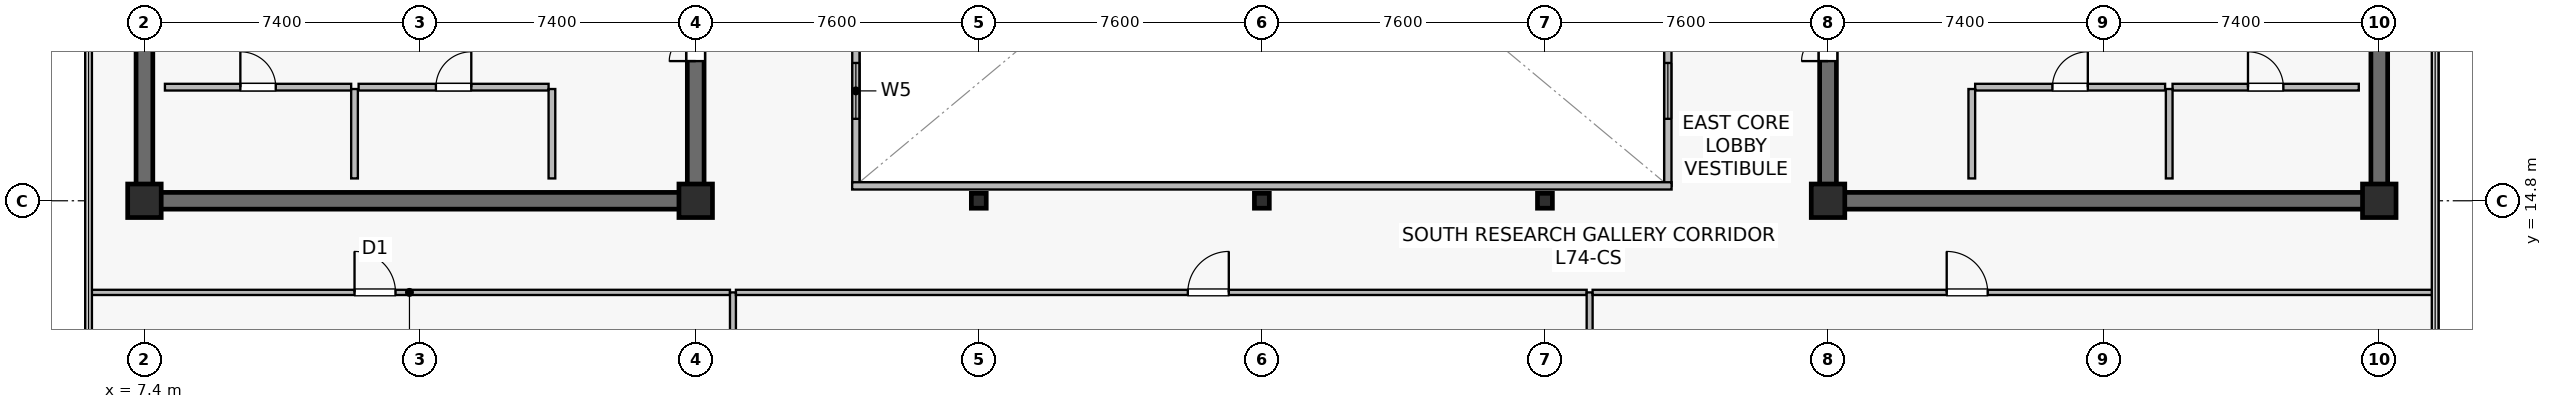
"""IFC4 building model, lengths in metres.
Left out: names, types, materials, properties, quantities, classifications, styles, units other than length and angle.
Written with IfcOpenShell. Run it as: python <this file> out.ifc"""

import sys

from ifc_helpers import new_model, si_unit, direction, frame, frame_2d, origin, origin_2d, place, context, subcontext, project, spatial, rectangle, i_section, extrude, source, transform, mapped, element, fill, save


model = new_model("IFC4")
c1 = context("Model", 3, precision=1e-05, world=origin(), true_north=direction((0.0, 1.0)))
c2 = subcontext(c1, "Body", "Model", "MODEL_VIEW")
j1 = project(units=[si_unit("LENGTHUNIT", "METRE"), si_unit("PLANEANGLEUNIT", "RADIAN")], contexts=[c1])
p1 = place(None, origin())
s1 = spatial("IfcSite", under=j1, at=p1, CompositionType="ELEMENT")
p2 = place(p1, origin())
s2 = spatial("IfcBuilding", under=s1, at=p2, CompositionType="ELEMENT")
p3 = place(p2, frame((0.0, 0.0, 310.2)))
s3 = spatial("IfcBuildingStorey", under=s2, at=p3, CompositionType="ELEMENT", Elevation=310.2)
p4 = place(p3, frame((7.175, 14.8, 0.0), z_axis=(0.0, 0.0, 1.0), x_axis=(1.0, 0.0, 0.0)))
e1 = element("IfcWall", 1, at=p4, inside=s3, PredefinedType="SHEAR", context=c2, shape_type="SweptSolid", body=[
    extrude(rectangle(XDim=15.25, YDim=0.45, at=frame_2d((7.625, 0.0))), origin(), (0.0, 0.0, 1.0), 3.9),
])
p5 = place(p3, frame((7.4, 15.025, 0.0), z_axis=(0.0, 0.0, 1.0), x_axis=(0.0, 1.0, 0.0)))
e2 = element("IfcWall", 2, at=p5, inside=s3, PredefinedType="SHEAR", context=c2, shape_type="SweptSolid", body=[
    extrude(rectangle(XDim=18.55, YDim=0.45, at=frame_2d((9.275, 0.0))), origin(), (0.0, 0.0, 1.0), 3.9),
])
p6 = place(p3, frame((22.2, 15.025, 0.0), z_axis=(0.0, 0.0, 1.0), x_axis=(0.0, 1.0, 0.0)))
e3 = element("IfcWall", 3, at=p6, inside=s3, PredefinedType="SHEAR", context=c2, shape_type="SweptSolid", body=[
    extrude(rectangle(XDim=18.55, YDim=0.45, at=frame_2d((9.275, 0.0))), origin(), (0.0, 0.0, 1.0), 3.9),
])
p7 = place(p6, frame((3.525, 0.0, 0.0)))
e4 = element("IfcOpeningElement", 4, at=p7, cuts=e3, PredefinedType="OPENING", context=c2, shape_type="SweptSolid", body=[
    extrude(rectangle(XDim=1.42, YDim=2.2, at=frame_2d((0.71, 1.1))), frame((0.0, 0.235, 0.0), z_axis=(0.0, -1.0, 0.0), x_axis=(1.0, 0.0, 0.0)), (0.0, 0.0, 1.0), 0.47),
])
p8 = place(p3, frame((52.375, 14.8, 0.0), z_axis=(0.0, 0.0, 1.0), x_axis=(1.0, 0.0, 0.0)))
e5 = element("IfcWall", 5, at=p8, inside=s3, PredefinedType="SHEAR", context=c2, shape_type="SweptSolid", body=[
    extrude(rectangle(XDim=15.25, YDim=0.45, at=frame_2d((7.625, 0.0))), origin(), (0.0, 0.0, 1.0), 3.9),
])
p9 = place(p3, frame((52.6, 15.025, 0.0), z_axis=(0.0, 0.0, 1.0), x_axis=(0.0, 1.0, 0.0)))
e6 = element("IfcWall", 6, at=p9, inside=s3, PredefinedType="SHEAR", context=c2, shape_type="SweptSolid", body=[
    extrude(rectangle(XDim=18.55, YDim=0.45, at=frame_2d((9.275, 0.0))), origin(), (0.0, 0.0, 1.0), 3.9),
])
p10 = place(p9, frame((3.525, 0.0, 0.0)))
e7 = element("IfcOpeningElement", 7, at=p10, cuts=e6, PredefinedType="OPENING", context=c2, shape_type="SweptSolid", body=[
    extrude(rectangle(XDim=1.42, YDim=2.2, at=frame_2d((0.71, 1.1))), frame((0.0, 0.235, 0.0), z_axis=(0.0, -1.0, 0.0), x_axis=(1.0, 0.0, 0.0)), (0.0, 0.0, 1.0), 0.47),
])
p11 = place(p3, frame((67.4, 15.025, 0.0), z_axis=(0.0, 0.0, 1.0), x_axis=(0.0, 1.0, 0.0)))
e8 = element("IfcWall", 8, at=p11, inside=s3, PredefinedType="SHEAR", context=c2, shape_type="SweptSolid", body=[
    extrude(rectangle(XDim=18.55, YDim=0.45, at=frame_2d((9.275, 0.0))), origin(), (0.0, 0.0, 1.0), 3.9),
])
m1 = source(origin(), c2, "Body", "SweptSolid", [
    extrude(rectangle(XDim=0.9, YDim=0.9, at=origin_2d()), origin(), (0.0, 0.0, 1.0), 4.2),
])
for number, where, z_axis, x_axis in (
    (9, (7.4, 14.8, 0.0), (0.0, 0.0, 1.0), (1.0, 0.0, 0.0)),
    (10, (22.2, 14.8, 0.0), (0.0, 0.0, 1.0), (1.0, 0.0, 0.0)),
    (11, (52.6, 14.8, 0.0), (0.0, 0.0, 1.0), (1.0, 0.0, 0.0)),
    (12, (67.4, 14.8, 0.0), (0.0, 0.0, 1.0), (1.0, 0.0, 0.0)),
):
    element("IfcColumn", number, at=place(p3, frame(where, z_axis=z_axis, x_axis=x_axis)), inside=s3, PredefinedType="COLUMN", context=c2, shape_type="MappedRepresentation", body=[
        mapped(m1, transform((0.0, 0.0, 0.0), scale=1.0)),
    ])
m2 = source(origin(), c2, "Body", "SweptSolid", [
    extrude(i_section(OverallWidth=0.4, OverallDepth=0.4, WebThickness=0.021, FlangeThickness=0.021, at=origin_2d()), origin(), (0.0, 0.0, 1.0), 4.2),
])
for number, where, z_axis, x_axis in (
    (13, (29.8, 14.8, 0.0), (0.0, 0.0, 1.0), (1.0, 0.0, 0.0)),
    (14, (37.4, 14.8, 0.0), (0.0, 0.0, 1.0), (1.0, 0.0, 0.0)),
    (15, (45.0, 14.8, 0.0), (0.0, 0.0, 1.0), (1.0, 0.0, 0.0)),
):
    element("IfcColumn", number, at=place(p3, frame(where, z_axis=z_axis, x_axis=x_axis)), inside=s3, PredefinedType="COLUMN", context=c2, shape_type="MappedRepresentation", body=[
        mapped(m2, transform((0.0, 0.0, 0.0), scale=1.0)),
    ])
p12 = place(p3, frame((7.95, 17.85, 0.0), z_axis=(0.0, 0.0, 1.0), x_axis=(1.0, 0.0, 0.0)))
e16 = element("IfcWall", 16, at=p12, inside=s3, PredefinedType="SOLIDWALL", context=c2, shape_type="SweptSolid", body=[
    extrude(rectangle(XDim=5.0, YDim=0.18, at=frame_2d((2.5, 0.0))), origin(), (0.0, 0.0, 1.0), 3.9),
])
p13 = place(p12, frame((2.025, 0.0, 0.0)))
e17 = element("IfcOpeningElement", 17, at=p13, cuts=e16, PredefinedType="OPENING", context=c2, shape_type="SweptSolid", body=[
    extrude(rectangle(XDim=0.95, YDim=2.15, at=frame_2d((0.475, 1.075))), frame((0.0, 0.1, 0.0), z_axis=(0.0, -1.0, 0.0), x_axis=(1.0, 0.0, 0.0)), (0.0, 0.0, 1.0), 0.2),
])
p14 = place(p3, frame((13.04, 15.4, 0.0), z_axis=(0.0, 0.0, 1.0), x_axis=(0.0, 1.0, 0.0)))
e18 = element("IfcWall", 18, at=p14, inside=s3, PredefinedType="SOLIDWALL", context=c2, shape_type="SweptSolid", body=[
    extrude(rectangle(XDim=2.4, YDim=0.18, at=frame_2d((1.2, 0.0))), origin(), (0.0, 0.0, 1.0), 3.9),
])
p15 = place(p3, frame((13.15, 17.85, 0.0), z_axis=(0.0, 0.0, 1.0), x_axis=(1.0, 0.0, 0.0)))
e19 = element("IfcWall", 19, at=p15, inside=s3, PredefinedType="SOLIDWALL", context=c2, shape_type="SweptSolid", body=[
    extrude(rectangle(XDim=5.1, YDim=0.18, at=frame_2d((2.55, 0.0))), origin(), (0.0, 0.0, 1.0), 3.297),
])
p16 = place(p15, frame((2.075, 0.0, 0.0)))
e20 = element("IfcOpeningElement", 20, at=p16, cuts=e19, PredefinedType="OPENING", context=c2, shape_type="SweptSolid", body=[
    extrude(rectangle(XDim=0.95, YDim=2.15, at=frame_2d((0.475, 1.075))), frame((0.0, 0.1, 0.0), z_axis=(0.0, -1.0, 0.0), x_axis=(1.0, 0.0, 0.0)), (0.0, 0.0, 1.0), 0.2),
])
p17 = place(p3, frame((18.34, 15.4, 0.0), z_axis=(0.0, 0.0, 1.0), x_axis=(0.0, 1.0, 0.0)))
e21 = element("IfcWall", 21, at=p17, inside=s3, PredefinedType="SOLIDWALL", context=c2, shape_type="SweptSolid", body=[
    extrude(rectangle(XDim=2.4, YDim=0.18, at=frame_2d((1.2, 0.0))), origin(), (0.0, 0.0, 1.0), 3.9),
])
p18 = place(p3, frame((61.85, 17.85, 0.0), z_axis=(0.0, 0.0, 1.0), x_axis=(1.0, 0.0, 0.0)))
e22 = element("IfcWall", 22, at=p18, inside=s3, PredefinedType="SOLIDWALL", context=c2, shape_type="SweptSolid", body=[
    extrude(rectangle(XDim=5.0, YDim=0.18, at=frame_2d((2.5, 0.0))), origin(), (0.0, 0.0, 1.0), 3.9),
])
p19 = place(p18, frame((2.025, 0.0, 0.0)))
e23 = element("IfcOpeningElement", 23, at=p19, cuts=e22, PredefinedType="OPENING", context=c2, shape_type="SweptSolid", body=[
    extrude(rectangle(XDim=0.95, YDim=2.15, at=frame_2d((0.475, 1.075))), frame((0.0, 0.1, 0.0), z_axis=(0.0, -1.0, 0.0), x_axis=(1.0, 0.0, 0.0)), (0.0, 0.0, 1.0), 0.2),
])
p20 = place(p3, frame((61.76, 15.4, 0.0), z_axis=(0.0, 0.0, 1.0), x_axis=(0.0, 1.0, 0.0)))
e24 = element("IfcWall", 24, at=p20, inside=s3, PredefinedType="SOLIDWALL", context=c2, shape_type="SweptSolid", body=[
    extrude(rectangle(XDim=2.4, YDim=0.18, at=frame_2d((1.2, 0.0))), origin(), (0.0, 0.0, 1.0), 3.9),
])
p21 = place(p3, frame((56.55, 17.85, 0.0), z_axis=(0.0, 0.0, 1.0), x_axis=(1.0, 0.0, 0.0)))
e25 = element("IfcWall", 25, at=p21, inside=s3, PredefinedType="SOLIDWALL", context=c2, shape_type="SweptSolid", body=[
    extrude(rectangle(XDim=5.1, YDim=0.18, at=frame_2d((2.55, 0.0))), origin(), (0.0, 0.0, 1.0), 3.297),
])
p22 = place(p21, frame((2.075, 0.0, 0.0)))
e26 = element("IfcOpeningElement", 26, at=p22, cuts=e25, PredefinedType="OPENING", context=c2, shape_type="SweptSolid", body=[
    extrude(rectangle(XDim=0.95, YDim=2.15, at=frame_2d((0.475, 1.075))), frame((0.0, 0.1, 0.0), z_axis=(0.0, -1.0, 0.0), x_axis=(1.0, 0.0, 0.0)), (0.0, 0.0, 1.0), 0.2),
])
p23 = place(p3, frame((56.46, 15.4, 0.0), z_axis=(0.0, 0.0, 1.0), x_axis=(0.0, 1.0, 0.0)))
e27 = element("IfcWall", 27, at=p23, inside=s3, PredefinedType="SOLIDWALL", context=c2, shape_type="SweptSolid", body=[
    extrude(rectangle(XDim=2.4, YDim=0.18, at=frame_2d((1.2, 0.0))), origin(), (0.0, 0.0, 1.0), 3.9),
])
p24 = place(p3, frame((26.5, 15.2, 0.0), z_axis=(0.0, 0.0, 1.0), x_axis=(0.0, 1.0, 0.0)))
e28 = element("IfcWall", 28, at=p24, inside=s3, PredefinedType="SOLIDWALL", context=c2, shape_type="SweptSolid", body=[
    extrude(rectangle(XDim=18.2, YDim=0.195, at=frame_2d((9.1, 0.0))), origin(), (0.0, 0.0, 1.0), 3.9),
])
p25 = place(p24, frame((1.8, 0.0, 0.9)))
e29 = element("IfcOpeningElement", 29, at=p25, cuts=e28, PredefinedType="OPENING", context=c2, shape_type="SweptSolid", body=[
    extrude(rectangle(XDim=1.5, YDim=1.4, at=frame_2d((0.75, 0.7))), frame((0.0, 0.107, 0.0), z_axis=(0.0, -1.0, 0.0), x_axis=(1.0, 0.0, 0.0)), (0.0, 0.0, 1.0), 0.215),
])
p26 = place(p24, frame((13.2, 0.0, 0.9)))
e30 = element("IfcOpeningElement", 30, at=p26, cuts=e28, PredefinedType="OPENING", context=c2, shape_type="SweptSolid", body=[
    extrude(rectangle(XDim=1.5, YDim=1.4, at=frame_2d((0.75, 0.7))), frame((0.0, 0.107, 0.0), z_axis=(0.0, -1.0, 0.0), x_axis=(1.0, 0.0, 0.0)), (0.0, 0.0, 1.0), 0.215),
])
p27 = place(p3, frame((48.3, 15.2, 0.0), z_axis=(0.0, 0.0, 1.0), x_axis=(0.0, 1.0, 0.0)))
e31 = element("IfcWall", 31, at=p27, inside=s3, PredefinedType="SOLIDWALL", context=c2, shape_type="SweptSolid", body=[
    extrude(rectangle(XDim=18.2, YDim=0.195, at=frame_2d((9.1, 0.0))), origin(), (0.0, 0.0, 1.0), 3.9),
])
p28 = place(p27, frame((1.8, 0.0, 0.9)))
e32 = element("IfcOpeningElement", 32, at=p28, cuts=e31, PredefinedType="OPENING", context=c2, shape_type="SweptSolid", body=[
    extrude(rectangle(XDim=1.5, YDim=1.4, at=frame_2d((0.75, 0.7))), frame((0.0, 0.107, 0.0), z_axis=(0.0, -1.0, 0.0), x_axis=(1.0, 0.0, 0.0)), (0.0, 0.0, 1.0), 0.215),
])
p29 = place(p27, frame((13.2, 0.0, 0.9)))
e33 = element("IfcOpeningElement", 33, at=p29, cuts=e31, PredefinedType="OPENING", context=c2, shape_type="SweptSolid", body=[
    extrude(rectangle(XDim=1.5, YDim=1.4, at=frame_2d((0.75, 0.7))), frame((0.0, 0.107, 0.0), z_axis=(0.0, -1.0, 0.0), x_axis=(1.0, 0.0, 0.0)), (0.0, 0.0, 1.0), 0.215),
])
p30 = place(p3, frame((26.4, 15.2, 0.0), z_axis=(0.0, 0.0, 1.0), x_axis=(1.0, 0.0, 0.0)))
e34 = element("IfcWall", 34, at=p30, inside=s3, PredefinedType="SOLIDWALL", context=c2, shape_type="SweptSolid", body=[
    extrude(rectangle(XDim=22.0, YDim=0.195, at=frame_2d((11.0, 0.0))), origin(), (0.0, 0.0, 1.0), 3.9),
])
p31 = place(p3, frame((5.91, 12.34, 0.0), z_axis=(0.0, 0.0, 1.0), x_axis=(1.0, 0.0, 0.0)))
e35 = element("IfcWall", 35, at=p31, inside=s3, PredefinedType="PARTITIONING", context=c2, shape_type="SweptSolid", body=[
    extrude(rectangle(XDim=17.21, YDim=0.14, at=frame_2d((8.605, 0.0))), origin(), (0.0, 0.0, 1.0), 3.297),
])
p32 = place(p31, frame((7.13, 0.0, 0.0)))
e36 = element("IfcOpeningElement", 36, at=p32, cuts=e35, PredefinedType="OPENING", context=c2, shape_type="SweptSolid", body=[
    extrude(rectangle(XDim=1.1, YDim=2.18, at=frame_2d((0.55, 1.09))), frame((0.0, 0.08, 0.0), z_axis=(0.0, -1.0, 0.0), x_axis=(1.0, 0.0, 0.0)), (0.0, 0.0, 1.0), 0.16),
])
p33 = place(p3, frame((23.2, 3.81, 0.0), z_axis=(0.0, 0.0, 1.0), x_axis=(0.0, 1.0, 0.0)))
e37 = element("IfcWall", 37, at=p33, inside=s3, PredefinedType="PARTITIONING", context=c2, shape_type="SweptSolid", body=[
    extrude(rectangle(XDim=8.53, YDim=0.16, at=frame_2d((4.265, 0.0))), origin(), (0.0, 0.0, 1.0), 2.985),
])
p34 = place(p3, frame((23.28, 12.34, 0.0), z_axis=(0.0, 0.0, 1.0), x_axis=(1.0, 0.0, 0.0)))
e38 = element("IfcWall", 38, at=p34, inside=s3, PredefinedType="PARTITIONING", context=c2, shape_type="SweptSolid", body=[
    extrude(rectangle(XDim=22.84, YDim=0.14, at=frame_2d((11.42, 0.0))), origin(), (0.0, 0.0, 1.0), 3.297),
])
p35 = place(p34, frame((12.132, 0.0, 0.0)))
e39 = element("IfcOpeningElement", 39, at=p35, cuts=e38, PredefinedType="OPENING", context=c2, shape_type="SweptSolid", body=[
    extrude(rectangle(XDim=1.1, YDim=2.18, at=frame_2d((0.55, 1.09))), frame((0.0, 0.08, 0.0), z_axis=(0.0, -1.0, 0.0), x_axis=(1.0, 0.0, 0.0)), (0.0, 0.0, 1.0), 0.16),
])
p36 = place(p3, frame((46.2, 4.81, 0.0), z_axis=(0.0, 0.0, 1.0), x_axis=(0.0, 1.0, 0.0)))
e40 = element("IfcWall", 40, at=p36, inside=s3, PredefinedType="PARTITIONING", context=c2, shape_type="SweptSolid", body=[
    extrude(rectangle(XDim=7.53, YDim=0.16, at=frame_2d((3.765, 0.0))), origin(), (0.0, 0.0, 1.0), 2.985),
])
p37 = place(p3, frame((46.28, 12.34, 0.0), z_axis=(0.0, 0.0, 1.0), x_axis=(1.0, 0.0, 0.0)))
e41 = element("IfcWall", 41, at=p37, inside=s3, PredefinedType="PARTITIONING", context=c2, shape_type="SweptSolid", body=[
    extrude(rectangle(XDim=22.61, YDim=0.14, at=frame_2d((11.305, 0.0))), origin(), (0.0, 0.0, 1.0), 3.297),
])
p38 = place(p37, frame((9.506, 0.0, 0.0)))
e42 = element("IfcOpeningElement", 42, at=p38, cuts=e41, PredefinedType="OPENING", context=c2, shape_type="SweptSolid", body=[
    extrude(rectangle(XDim=1.1, YDim=2.18, at=frame_2d((0.55, 1.09))), frame((0.0, 0.08, 0.0), z_axis=(0.0, -1.0, 0.0), x_axis=(1.0, 0.0, 0.0)), (0.0, 0.0, 1.0), 0.16),
])
m3 = source(origin(), c2, "Body", "SweptSolid", [
    extrude(rectangle(XDim=1.5, YDim=1.4, at=frame_2d((0.75, 0.7))), frame((0.0, 0.03, 0.0), z_axis=(0.0, -1.0, 0.0), x_axis=(1.0, 0.0, 0.0)), (0.0, 0.0, 1.0), 0.06),
])
p39 = place(p25, origin())
e43 = element("IfcWindow", 43, at=p39, inside=s3, PartitioningType="SINGLE_PANEL", PredefinedType="WINDOW", context=c2, shape_type="MappedRepresentation", body=[
    mapped(m3, transform((0.0, 0.0, 0.0), scale=1.0)),
])
fill(e29, e43)
p40 = place(p28, origin())
e44 = element("IfcWindow", 44, at=p40, inside=s3, PartitioningType="SINGLE_PANEL", PredefinedType="WINDOW", context=c2, shape_type="MappedRepresentation", body=[
    mapped(m3, transform((0.0, 0.0, 0.0), scale=1.0)),
])
fill(e32, e44)
m4 = source(origin(), c2, "Body", "SweptSolid", [
    extrude(rectangle(XDim=0.95, YDim=2.15, at=frame_2d((0.475, 1.075))), frame((0.0, 0.025, 0.0), z_axis=(0.0, -1.0, 0.0), x_axis=(1.0, 0.0, 0.0)), (0.0, 0.0, 1.0), 0.05),
])
p41 = place(p13, origin())
e45 = element("IfcDoor", 45, at=p41, inside=s3, OperationType="SINGLE_SWING_LEFT", PredefinedType="DOOR", context=c2, shape_type="MappedRepresentation", body=[
    mapped(m4, transform((0.0, 0.0, 0.0), scale=1.0)),
])
fill(e17, e45)
p42 = place(p16, origin())
e46 = element("IfcDoor", 46, at=p42, inside=s3, OperationType="SINGLE_SWING_RIGHT", PredefinedType="DOOR", context=c2, shape_type="MappedRepresentation", body=[
    mapped(m4, transform((0.0, 0.0, 0.0), scale=1.0)),
])
fill(e20, e46)
m5 = source(origin(), c2, "Body", "SweptSolid", [
    extrude(rectangle(XDim=1.42, YDim=2.2, at=frame_2d((0.71, 1.1))), frame((0.0, 0.025, 0.0), z_axis=(0.0, -1.0, 0.0), x_axis=(1.0, 0.0, 0.0)), (0.0, 0.0, 1.0), 0.05),
])
p43 = place(p7, origin())
e47 = element("IfcDoor", 47, at=p43, inside=s3, OperationType="DOUBLE_DOOR_SINGLE_SWING", PredefinedType="DOOR", context=c2, shape_type="MappedRepresentation", body=[
    mapped(m5, transform((0.0, 0.0, 0.0), scale=1.0)),
])
fill(e4, e47)
p44 = place(p19, origin())
e48 = element("IfcDoor", 48, at=p44, inside=s3, OperationType="SINGLE_SWING_LEFT", PredefinedType="DOOR", context=c2, shape_type="MappedRepresentation", body=[
    mapped(m4, transform((0.0, 0.0, 0.0), scale=1.0)),
])
fill(e23, e48)
p45 = place(p22, origin())
e49 = element("IfcDoor", 49, at=p45, inside=s3, OperationType="SINGLE_SWING_RIGHT", PredefinedType="DOOR", context=c2, shape_type="MappedRepresentation", body=[
    mapped(m4, transform((0.0, 0.0, 0.0), scale=1.0)),
])
fill(e26, e49)
p46 = place(p10, origin())
e50 = element("IfcDoor", 50, at=p46, inside=s3, OperationType="DOUBLE_DOOR_SINGLE_SWING", PredefinedType="DOOR", context=c2, shape_type="MappedRepresentation", body=[
    mapped(m5, transform((0.0, 0.0, 0.0), scale=1.0)),
])
fill(e7, e50)
m6 = source(origin(), c2, "Body", "SweptSolid", [
    extrude(rectangle(XDim=1.1, YDim=2.18, at=frame_2d((0.55, 1.09))), frame((0.0, 0.025, 0.0), z_axis=(0.0, -1.0, 0.0), x_axis=(1.0, 0.0, 0.0)), (0.0, 0.0, 1.0), 0.05),
])
p47 = place(p32, origin())
e51 = element("IfcDoor", 51, at=p47, inside=s3, OperationType="SINGLE_SWING_LEFT", PredefinedType="DOOR", context=c2, shape_type="MappedRepresentation", body=[
    mapped(m6, transform((0.0, 0.0, 0.0), scale=1.0)),
])
fill(e36, e51)
p48 = place(p35, origin())
e52 = element("IfcDoor", 52, at=p48, inside=s3, OperationType="SINGLE_SWING_RIGHT", PredefinedType="DOOR", context=c2, shape_type="MappedRepresentation", body=[
    mapped(m6, transform((0.0, 0.0, 0.0), scale=1.0)),
])
fill(e39, e52)
p49 = place(p38, origin())
e53 = element("IfcDoor", 53, at=p49, inside=s3, OperationType="SINGLE_SWING_LEFT", PredefinedType="DOOR", context=c2, shape_type="MappedRepresentation", body=[
    mapped(m6, transform((0.0, 0.0, 0.0), scale=1.0)),
])
fill(e42, e53)
save(model, sys.argv[1])
